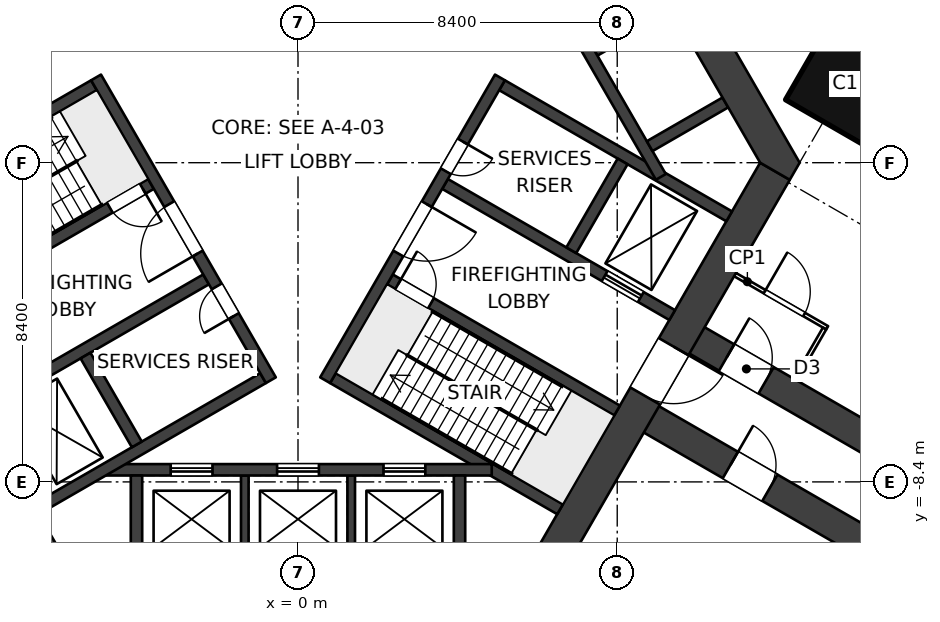
"""IFC4 building model, lengths in metres.
Left out: names, types, materials, properties, quantities, classifications, styles, units other than length and angle.
Written with IfcOpenShell. Run it as: python <this file> out.ifc"""

import sys

from ifc_helpers import new_model, si_unit, direction, frame, frame_2d, origin, origin_2d, place, context, subcontext, project, spatial, polyline, rectangle, outline, extrude, element, fill, save


model = new_model("IFC4")
c1 = context("Model", 3, precision=1e-05, world=origin(), true_north=direction((0.0, 1.0)))
c2 = subcontext(c1, "Body", "Model", "MODEL_VIEW")
j1 = project(units=[si_unit("LENGTHUNIT", "METRE"), si_unit("PLANEANGLEUNIT", "RADIAN")], contexts=[c1])
p1 = place(None, origin())
s1 = spatial("IfcSite", under=j1, at=p1, CompositionType="ELEMENT")
p2 = place(p1, origin())
s2 = spatial("IfcBuilding", under=s1, at=p2, CompositionType="ELEMENT")
p3 = place(p2, frame((0.0, 0.0, 16.0)))
s3 = spatial("IfcBuildingStorey", under=s2, at=p3, CompositionType="ELEMENT", Elevation=16.0)
p4 = place(p3, frame((14.4, 2.078, 0.0), z_axis=(0.0, 0.0, 1.0), x_axis=(-0.5, -0.866025403784, 0.0)))
e1 = element("IfcColumn", 1, at=p4, inside=s3, PredefinedType="COLUMN", context=c2, shape_type="SweptSolid", body=[
    extrude(rectangle(XDim=2.3, YDim=2.3, at=origin_2d()), origin(), (0.0, 0.0, 1.0), 5.0),
])
p5 = place(p3, frame((-6.47, -10.757, 0.0), z_axis=(0.0, 0.0, 1.0), x_axis=(-0.499997612506, 0.8660267822, 0.0)))
e2 = element("IfcWall", 2, at=p5, inside=s3, PredefinedType="SHEAR", context=c2, shape_type="SweptSolid", body=[
    extrude(rectangle(XDim=12.161, YDim=0.9, at=frame_2d((6.08, 0.0))), origin(), (0.0, 0.0, 1.0), 5.0),
])
p6 = place(p5, frame((5.33, 0.0, 0.0)))
e3 = element("IfcOpeningElement", 3, at=p6, cuts=e2, PredefinedType="OPENING", context=c2, shape_type="SweptSolid", body=[
    extrude(rectangle(XDim=1.5, YDim=2.1, at=frame_2d((0.75, 1.05))), frame((0.0, 0.46, 0.0), z_axis=(0.0, -1.0, 0.0), x_axis=(1.0, 0.0, 0.0)), (0.0, 0.0, 1.0), 0.92),
])
p7 = place(p3, frame((12.551, -0.225, 0.0), z_axis=(0.0, 0.0, 1.0), x_axis=(-0.499997612506, -0.8660267822, 0.0)))
e4 = element("IfcWall", 4, at=p7, inside=s3, PredefinedType="SHEAR", context=c2, shape_type="SweptSolid", body=[
    extrude(rectangle(XDim=12.161, YDim=0.9, at=frame_2d((6.08, 0.0))), origin(), (0.0, 0.0, 1.0), 5.0),
])
p8 = place(p7, frame((5.33, 0.0, 0.0)))
e5 = element("IfcOpeningElement", 5, at=p8, cuts=e4, PredefinedType="OPENING", context=c2, shape_type="SweptSolid", body=[
    extrude(rectangle(XDim=1.5, YDim=2.1, at=frame_2d((0.75, 1.05))), frame((0.0, 0.46, 0.0), z_axis=(0.0, -1.0, 0.0), x_axis=(1.0, 0.0, 0.0)), (0.0, 0.0, 1.0), 0.92),
])
p9 = place(p3, origin())
e6 = element("IfcWall", 6, at=p9, inside=s3, PredefinedType="SHEAR", context=c2, shape_type="SweptSolid", body=[
    extrude(outline(polyline([(13.2, 0.0), (6.6, 11.432), (6.08, 11.432), (6.08, 10.531), (12.161, 0.0), (12.94, -0.45), (13.2, 0.0)])), origin(), (0.0, 0.0, 1.0), 5.0),
])
p10 = place(p3, origin())
e7 = element("IfcWall", 7, at=p10, inside=s3, PredefinedType="SHEAR", context=c2, shape_type="SweptSolid", body=[
    extrude(outline(polyline([(-6.6, 11.432), (-13.2, 0.0), (-12.94, -0.45), (-12.161, 0.0), (-6.08, 10.531), (-6.08, 11.432), (-6.6, 11.432)])), origin(), (0.0, 0.0, 1.0), 5.0),
])
p11 = place(p3, frame((-0.714, -5.724, 0.0), z_axis=(0.0, 0.0, 1.0), x_axis=(-0.499995050369, 0.866028261437, 0.0)))
e8 = element("IfcWall", 8, at=p11, inside=s3, PredefinedType="SHEAR", context=c2, shape_type="SweptSolid", body=[
    extrude(rectangle(XDim=9.2, YDim=0.3, at=frame_2d((4.6, 0.0))), origin(), (0.0, 0.0, 1.0), 5.0),
])
p12 = place(p11, frame((3.85, 0.0, 0.0)))
e9 = element("IfcOpeningElement", 9, at=p12, cuts=e8, PredefinedType="OPENING", context=c2, shape_type="SweptSolid", body=[
    extrude(rectangle(XDim=1.5, YDim=2.1, at=frame_2d((0.75, 1.05))), frame((0.0, 0.16, 0.0), z_axis=(0.0, -1.0, 0.0), x_axis=(1.0, 0.0, 0.0)), (0.0, 0.0, 1.0), 0.32),
])
p13 = place(p11, frame((1.95, 0.0, 0.0)))
e10 = element("IfcOpeningElement", 10, at=p13, cuts=e8, PredefinedType="OPENING", context=c2, shape_type="SweptSolid", body=[
    extrude(rectangle(XDim=0.9, YDim=2.1, at=frame_2d((0.45, 1.05))), frame((0.0, 0.16, 0.0), z_axis=(0.0, -1.0, 0.0), x_axis=(1.0, 0.0, 0.0)), (0.0, 0.0, 1.0), 0.32),
])
p14 = place(p3, frame((-3.869, -0.559, 0.0), z_axis=(0.0, 0.0, 1.0), x_axis=(-0.86602711848, -0.499997030048, 0.0)))
e11 = element("IfcWall", 11, at=p14, inside=s3, PredefinedType="SHEAR", context=c2, shape_type="SweptSolid", body=[
    extrude(rectangle(XDim=6.901, YDim=0.3, at=frame_2d((3.451, 0.0))), origin(), (0.0, 0.0, 1.0), 5.0),
])
p15 = place(p14, frame((0.25, 0.0, 0.0)))
e12 = element("IfcOpeningElement", 12, at=p15, cuts=e11, PredefinedType="OPENING", context=c2, shape_type="SweptSolid", body=[
    extrude(rectangle(XDim=1.0, YDim=2.1, at=frame_2d((0.5, 1.05))), frame((0.0, 0.16, 0.0), z_axis=(0.0, -1.0, 0.0), x_axis=(1.0, 0.0, 0.0)), (0.0, 0.0, 1.0), 0.32),
])
p16 = place(p3, frame((-5.369, 2.039, 0.0), z_axis=(0.0, 0.0, 1.0), x_axis=(-0.86602711848, -0.499997030048, 0.0)))
e13 = element("IfcWall", 13, at=p16, inside=s3, PredefinedType="SHEAR", context=c2, shape_type="SweptSolid", body=[
    extrude(rectangle(XDim=6.901, YDim=0.3, at=frame_2d((3.451, 0.0))), origin(), (0.0, 0.0, 1.0), 5.0),
])
p17 = place(p3, frame((-2.419, -3.071, 0.0), z_axis=(0.0, 0.0, 1.0), x_axis=(-0.86602711848, -0.499997030048, 0.0)))
e14 = element("IfcWall", 14, at=p17, inside=s3, PredefinedType="SHEAR", context=c2, shape_type="SweptSolid", body=[
    extrude(rectangle(XDim=6.901, YDim=0.3, at=frame_2d((3.451, 0.0))), origin(), (0.0, 0.0, 1.0), 5.0),
])
p18 = place(p17, frame((4.85, 0.0, 0.0)))
e15 = element("IfcOpeningElement", 15, at=p18, cuts=e14, PredefinedType="OPENING", context=c2, shape_type="SweptSolid", body=[
    extrude(rectangle(XDim=1.1, YDim=2.1, at=frame_2d((0.55, 1.05))), frame((0.0, 0.16, 0.0), z_axis=(0.0, -1.0, 0.0), x_axis=(1.0, 0.0, 0.0)), (0.0, 0.0, 1.0), 0.32),
])
p19 = place(p3, frame((-0.919, -5.669, 0.0), z_axis=(0.0, 0.0, 1.0), x_axis=(-0.866011800373, -0.500023561059, 0.0)))
e16 = element("IfcWall", 16, at=p19, inside=s3, PredefinedType="SHEAR", context=c2, shape_type="SweptSolid", body=[
    extrude(rectangle(XDim=6.902, YDim=0.3, at=frame_2d((3.451, 0.0))), origin(), (0.0, 0.0, 1.0), 5.0),
])
p20 = place(p3, frame((-4.241, -7.414, 0.0), z_axis=(0.0, 0.0, 1.0), x_axis=(-0.500048589285, 0.86599734893, 0.0)))
e17 = element("IfcWall", 17, at=p20, inside=s3, PredefinedType="SHEAR", context=c2, shape_type="SweptSolid", body=[
    extrude(rectangle(XDim=2.7, YDim=0.3, at=frame_2d((1.35, 0.0))), origin(), (0.0, 0.0, 1.0), 5.0),
])
p21 = place(p3, frame((5.314, 2.244, 0.0), z_axis=(0.0, 0.0, 1.0), x_axis=(-0.499995050369, -0.866028261437, 0.0)))
e18 = element("IfcWall", 18, at=p21, inside=s3, PredefinedType="SHEAR", context=c2, shape_type="SweptSolid", body=[
    extrude(rectangle(XDim=9.2, YDim=0.3, at=frame_2d((4.6, 0.0))), origin(), (0.0, 0.0, 1.0), 5.0),
])
p22 = place(p21, frame((3.85, 0.0, 0.0)))
e19 = element("IfcOpeningElement", 19, at=p22, cuts=e18, PredefinedType="OPENING", context=c2, shape_type="SweptSolid", body=[
    extrude(rectangle(XDim=1.5, YDim=2.1, at=frame_2d((0.75, 1.05))), frame((0.0, 0.16, 0.0), z_axis=(0.0, -1.0, 0.0), x_axis=(1.0, 0.0, 0.0)), (0.0, 0.0, 1.0), 0.32),
])
p23 = place(p21, frame((1.95, 0.0, 0.0)))
e20 = element("IfcOpeningElement", 20, at=p23, cuts=e18, PredefinedType="OPENING", context=c2, shape_type="SweptSolid", body=[
    extrude(rectangle(XDim=0.9, YDim=2.1, at=frame_2d((0.45, 1.05))), frame((0.0, 0.16, 0.0), z_axis=(0.0, -1.0, 0.0), x_axis=(1.0, 0.0, 0.0)), (0.0, 0.0, 1.0), 0.32),
])
p24 = place(p3, frame((2.419, -3.071, 0.0), z_axis=(0.0, 0.0, 1.0), x_axis=(0.86602711848, -0.499997030048, 0.0)))
e21 = element("IfcWall", 21, at=p24, inside=s3, PredefinedType="SHEAR", context=c2, shape_type="SweptSolid", body=[
    extrude(rectangle(XDim=6.901, YDim=0.3, at=frame_2d((3.451, 0.0))), origin(), (0.0, 0.0, 1.0), 5.0),
])
p25 = place(p24, frame((0.25, 0.0, 0.0)))
e22 = element("IfcOpeningElement", 22, at=p25, cuts=e21, PredefinedType="OPENING", context=c2, shape_type="SweptSolid", body=[
    extrude(rectangle(XDim=1.0, YDim=2.1, at=frame_2d((0.5, 1.05))), frame((0.0, 0.16, 0.0), z_axis=(0.0, -1.0, 0.0), x_axis=(1.0, 0.0, 0.0)), (0.0, 0.0, 1.0), 0.32),
])
p26 = place(p3, frame((0.919, -5.669, 0.0), z_axis=(0.0, 0.0, 1.0), x_axis=(0.866011800373, -0.500023561059, 0.0)))
e23 = element("IfcWall", 23, at=p26, inside=s3, PredefinedType="SHEAR", context=c2, shape_type="SweptSolid", body=[
    extrude(rectangle(XDim=6.902, YDim=0.3, at=frame_2d((3.451, 0.0))), origin(), (0.0, 0.0, 1.0), 5.0),
])
p27 = place(p3, frame((3.869, -0.559, 0.0), z_axis=(0.0, 0.0, 1.0), x_axis=(0.86602711848, -0.499997030048, 0.0)))
e24 = element("IfcWall", 24, at=p27, inside=s3, PredefinedType="SHEAR", context=c2, shape_type="SweptSolid", body=[
    extrude(rectangle(XDim=6.901, YDim=0.3, at=frame_2d((3.451, 0.0))), origin(), (0.0, 0.0, 1.0), 5.0),
])
p28 = place(p27, frame((4.85, 0.0, 0.0)))
e25 = element("IfcOpeningElement", 25, at=p28, cuts=e24, PredefinedType="OPENING", context=c2, shape_type="SweptSolid", body=[
    extrude(rectangle(XDim=1.1, YDim=2.1, at=frame_2d((0.55, 1.05))), frame((0.0, 0.16, 0.0), z_axis=(0.0, -1.0, 0.0), x_axis=(1.0, 0.0, 0.0)), (0.0, 0.0, 1.0), 0.32),
])
p29 = place(p3, frame((5.369, 2.039, 0.0), z_axis=(0.0, 0.0, 1.0), x_axis=(0.86602711848, -0.499997030048, 0.0)))
e26 = element("IfcWall", 26, at=p29, inside=s3, PredefinedType="SHEAR", context=c2, shape_type="SweptSolid", body=[
    extrude(rectangle(XDim=6.901, YDim=0.3, at=frame_2d((3.451, 0.0))), origin(), (0.0, 0.0, 1.0), 5.0),
])
p30 = place(p3, frame((8.541, 0.034, 0.0), z_axis=(0.0, 0.0, 1.0), x_axis=(-0.50000943426, -0.866019956843, 0.0)))
e27 = element("IfcWall", 27, at=p30, inside=s3, PredefinedType="SHEAR", context=c2, shape_type="SweptSolid", body=[
    extrude(rectangle(XDim=2.7, YDim=0.3, at=frame_2d((1.35, 0.0))), origin(), (0.0, 0.0, 1.0), 5.0),
])
p31 = place(p3, frame((5.098, -8.082, 0.0), z_axis=(0.0, 0.0, 1.0), x_axis=(-1.0, 0.0, 0.0)))
e28 = element("IfcWall", 28, at=p31, inside=s3, PredefinedType="SHEAR", context=c2, shape_type="SweptSolid", body=[
    extrude(rectangle(XDim=10.195, YDim=0.3, at=frame_2d((5.098, 0.0))), origin(), (0.0, 0.0, 1.0), 5.0),
])
p32 = place(p31, frame((1.748, 0.0, 0.0)))
e29 = element("IfcOpeningElement", 29, at=p32, cuts=e28, PredefinedType="OPENING", context=c2, shape_type="SweptSolid", body=[
    extrude(rectangle(XDim=1.1, YDim=2.1, at=frame_2d((0.55, 1.05))), frame((0.0, 0.16, 0.0), z_axis=(0.0, -1.0, 0.0), x_axis=(1.0, 0.0, 0.0)), (0.0, 0.0, 1.0), 0.32),
])
p33 = place(p31, frame((4.548, 0.0, 0.0)))
e30 = element("IfcOpeningElement", 30, at=p33, cuts=e28, PredefinedType="OPENING", context=c2, shape_type="SweptSolid", body=[
    extrude(rectangle(XDim=1.1, YDim=2.1, at=frame_2d((0.55, 1.05))), frame((0.0, 0.16, 0.0), z_axis=(0.0, -1.0, 0.0), x_axis=(1.0, 0.0, 0.0)), (0.0, 0.0, 1.0), 0.32),
])
p34 = place(p31, frame((7.348, 0.0, 0.0)))
e31 = element("IfcOpeningElement", 31, at=p34, cuts=e28, PredefinedType="OPENING", context=c2, shape_type="SweptSolid", body=[
    extrude(rectangle(XDim=1.1, YDim=2.1, at=frame_2d((0.55, 1.05))), frame((0.0, 0.16, 0.0), z_axis=(0.0, -1.0, 0.0), x_axis=(1.0, 0.0, 0.0)), (0.0, 0.0, 1.0), 0.32),
])
for number, where, z_axis, x_axis in (
    (32, (4.25, -8.231, 0.0), (0.0, 0.0, 1.0), (0.0, -1.0, 0.0)),
    (33, (-4.25, -8.231, 0.0), (0.0, 0.0, 1.0), (0.0, -1.0, 0.0)),
):
    element("IfcWall", number, at=place(p3, frame(where, z_axis=z_axis, x_axis=x_axis)), inside=s3, PredefinedType="SHEAR", context=c2, shape_type="SweptSolid", body=[
        extrude(rectangle(XDim=2.3, YDim=0.3, at=frame_2d((1.15, 0.0))), origin(), (0.0, 0.0, 1.0), 5.0),
    ])
for number, where, z_axis, x_axis in (
    (34, (1.4, -8.231, 0.0), (0.0, 0.0, 1.0), (0.0, -1.0, 0.0)),
    (35, (-1.4, -8.231, 0.0), (0.0, 0.0, 1.0), (0.0, -1.0, 0.0)),
):
    element("IfcWall", number, at=place(p3, frame(where, z_axis=z_axis, x_axis=x_axis)), inside=s3, PredefinedType="SHEAR", context=c2, shape_type="SweptSolid", body=[
        extrude(rectangle(XDim=2.3, YDim=0.2, at=frame_2d((1.15, 0.0))), origin(), (0.0, 0.0, 1.0), 5.0),
    ])
p35 = place(p3, frame((4.45, 8.455, 0.0), z_axis=(0.0, 0.0, 1.0), x_axis=(0.500002290144, -0.866024081565, 0.0)))
e36 = element("IfcWall", 36, at=p35, inside=s3, PredefinedType="SHEAR", context=c2, shape_type="SweptSolid", body=[
    extrude(rectangle(XDim=10.195, YDim=0.3, at=frame_2d((5.098, 0.0))), origin(), (0.0, 0.0, 1.0), 5.0),
])
p36 = place(p3, frame((9.254, 0.435, 0.0), z_axis=(0.0, 0.0, 1.0), x_axis=(0.866007057882, 0.500031774688, 0.0)))
e37 = element("IfcWall", 37, at=p36, inside=s3, PredefinedType="SHEAR", context=c2, shape_type="SweptSolid", body=[
    extrude(rectangle(XDim=2.3, YDim=0.3, at=frame_2d((1.15, 0.0))), origin(), (0.0, 0.0, 1.0), 5.0),
])
p37 = place(p3, frame((7.829, 2.903, 0.0), z_axis=(0.0, 0.0, 1.0), x_axis=(0.866053019151, 0.499952165731, 0.0)))
e38 = element("IfcWall", 38, at=p37, inside=s3, PredefinedType="SHEAR", context=c2, shape_type="SweptSolid", body=[
    extrude(rectangle(XDim=2.3, YDim=0.2, at=frame_2d((1.15, 0.0))), origin(), (0.0, 0.0, 1.0), 5.0),
])
p38 = place(p3, frame((-9.548, -0.374, 0.0), z_axis=(0.0, 0.0, 1.0), x_axis=(0.500002290144, 0.866024081565, 0.0)))
e39 = element("IfcWall", 39, at=p38, inside=s3, PredefinedType="SHEAR", context=c2, shape_type="SweptSolid", body=[
    extrude(rectangle(XDim=10.195, YDim=0.3, at=frame_2d((5.098, 0.0))), origin(), (0.0, 0.0, 1.0), 5.0),
])
p39 = place(p3, frame((10.11, -4.451, 0.0), z_axis=(0.0, 0.0, 1.0), x_axis=(0.866025284237, -0.500000207062, 0.0)))
e40 = element("IfcWall", 40, at=p39, inside=s3, PredefinedType="SHEAR", context=c2, shape_type="SweptSolid", body=[
    extrude(rectangle(XDim=36.75, YDim=0.8, at=frame_2d((18.375, 0.0))), origin(), (0.0, 0.0, 1.0), 5.0),
])
p40 = place(p39, frame((1.35, 0.0, 0.0)))
e41 = element("IfcOpeningElement", 41, at=p40, cuts=e40, PredefinedType="OPENING", context=c2, shape_type="SweptSolid", body=[
    extrude(rectangle(XDim=1.2, YDim=2.1, at=frame_2d((0.6, 1.05))), frame((0.0, 0.41, 0.0), z_axis=(0.0, -1.0, 0.0), x_axis=(1.0, 0.0, 0.0)), (0.0, 0.0, 1.0), 0.82),
])
p41 = place(p3, frame((8.91, -6.53, 0.0), z_axis=(0.0, 0.0, 1.0), x_axis=(0.866025284237, -0.500000207062, 0.0)))
e42 = element("IfcWall", 42, at=p41, inside=s3, PredefinedType="SHEAR", context=c2, shape_type="SweptSolid", body=[
    extrude(rectangle(XDim=36.75, YDim=0.8, at=frame_2d((18.375, 0.0))), origin(), (0.0, 0.0, 1.0), 5.0),
])
p42 = place(p41, frame((10.0, 0.0, 0.0)))
e43 = element("IfcOpeningElement", 43, at=p42, cuts=e42, PredefinedType="OPENING", context=c2, shape_type="SweptSolid", body=[
    extrude(rectangle(XDim=1.0, YDim=2.1, at=frame_2d((0.5, 1.05))), frame((0.0, 0.41, 0.0), z_axis=(0.0, -1.0, 0.0), x_axis=(1.0, 0.0, 0.0)), (0.0, 0.0, 1.0), 0.82),
])
p43 = place(p41, frame((2.85, 0.0, 0.0)))
e44 = element("IfcOpeningElement", 44, at=p43, cuts=e42, PredefinedType="OPENING", context=c2, shape_type="SweptSolid", body=[
    extrude(rectangle(XDim=1.2, YDim=2.1, at=frame_2d((0.6, 1.05))), frame((0.0, 0.41, 0.0), z_axis=(0.0, -1.0, 0.0), x_axis=(1.0, 0.0, 0.0)), (0.0, 0.0, 1.0), 0.82),
])
p44 = place(p3, frame((11.5, -2.945, 0.0), z_axis=(0.0, 0.0, 1.0), x_axis=(0.866034573852, -0.49998411664, 0.0)))
e45 = element("IfcWall", 45, at=p44, inside=s3, PredefinedType="PARTITIONING", context=c2, shape_type="SweptSolid", body=[
    extrude(rectangle(XDim=2.8, YDim=0.1, at=frame_2d((1.4, 0.0))), origin(), (0.0, 0.0, 1.0), 4.7),
])
p45 = place(p44, frame((0.9, 0.0, 0.0)))
e46 = element("IfcOpeningElement", 46, at=p45, cuts=e45, PredefinedType="OPENING", context=c2, shape_type="SweptSolid", body=[
    extrude(rectangle(XDim=1.2, YDim=2.1, at=frame_2d((0.6, 1.05))), frame((0.0, 0.06, 0.0), z_axis=(0.0, -1.0, 0.0), x_axis=(1.0, 0.0, 0.0)), (0.0, 0.0, 1.0), 0.12),
])
p46 = place(p3, frame((13.082, -5.705, 0.0), z_axis=(0.0, 0.0, 1.0), x_axis=(0.500086022567, 0.865975732936, 0.0)))
e47 = element("IfcWall", 47, at=p46, inside=s3, PredefinedType="PARTITIONING", context=c2, shape_type="SweptSolid", body=[
    extrude(rectangle(XDim=1.55, YDim=0.1, at=frame_2d((0.775, 0.0))), origin(), (0.0, 0.0, 1.0), 4.7),
])
p47 = place(p3, frame((9.45, 6.495, 0.0), z_axis=(0.0, 0.0, 1.0), x_axis=(0.866025301493, -0.500000177174, 0.0)))
e48 = element("IfcWall", 48, at=p47, inside=s3, PredefinedType="SOLIDWALL", context=c2, shape_type="SweptSolid", body=[
    extrude(rectangle(XDim=43.095, YDim=0.3, at=frame_2d((21.548, 0.0))), origin(), (0.0, 0.0, 1.0), 4.7),
])
p48 = place(p47, frame((26.595, 0.0, 0.0)))
e49 = element("IfcOpeningElement", 49, at=p48, cuts=e48, PredefinedType="OPENING", context=c2, shape_type="SweptSolid", body=[
    extrude(rectangle(XDim=1.8, YDim=2.4, at=frame_2d((0.9, 1.2))), frame((0.0, 0.16, 0.0), z_axis=(0.0, -1.0, 0.0), x_axis=(1.0, 0.0, 0.0)), (0.0, 0.0, 1.0), 0.32),
])
p49 = place(p32, origin())
e50 = element("IfcDoor", 50, at=p49, inside=s3, OperationType="DOUBLE_DOOR_SLIDING", PredefinedType="DOOR", context=c2, shape_type="SweptSolid", body=[
    extrude(rectangle(XDim=1.1, YDim=2.1, at=frame_2d((0.55, 1.05))), frame((0.0, 0.025, 0.0), z_axis=(0.0, -1.0, 0.0), x_axis=(1.0, 0.0, 0.0)), (0.0, 0.0, 1.0), 0.05),
])
fill(e29, e50)
p50 = place(p33, origin())
e51 = element("IfcDoor", 51, at=p50, inside=s3, OperationType="DOUBLE_DOOR_SLIDING", PredefinedType="DOOR", context=c2, shape_type="SweptSolid", body=[
    extrude(rectangle(XDim=1.1, YDim=2.1, at=frame_2d((0.55, 1.05))), frame((0.0, 0.025, 0.0), z_axis=(0.0, -1.0, 0.0), x_axis=(1.0, 0.0, 0.0)), (0.0, 0.0, 1.0), 0.05),
])
fill(e30, e51)
p51 = place(p34, origin())
e52 = element("IfcDoor", 52, at=p51, inside=s3, OperationType="DOUBLE_DOOR_SLIDING", PredefinedType="DOOR", context=c2, shape_type="SweptSolid", body=[
    extrude(rectangle(XDim=1.1, YDim=2.1, at=frame_2d((0.55, 1.05))), frame((0.0, 0.025, 0.0), z_axis=(0.0, -1.0, 0.0), x_axis=(1.0, 0.0, 0.0)), (0.0, 0.0, 1.0), 0.05),
])
fill(e31, e52)
p52 = place(p28, origin())
e53 = element("IfcDoor", 53, at=p52, inside=s3, OperationType="DOUBLE_DOOR_SLIDING", PredefinedType="DOOR", context=c2, shape_type="SweptSolid", body=[
    extrude(rectangle(XDim=1.1, YDim=2.1, at=frame_2d((0.55, 1.05))), frame((0.0, 0.025, 0.0), z_axis=(0.0, -1.0, 0.0), x_axis=(1.0, 0.0, 0.0)), (0.0, 0.0, 1.0), 0.05),
])
fill(e25, e53)
p53 = place(p12, origin())
e54 = element("IfcDoor", 54, at=p53, inside=s3, OperationType="DOUBLE_DOOR_DOUBLE_SWING", PredefinedType="DOOR", context=c2, shape_type="SweptSolid", body=[
    extrude(rectangle(XDim=1.5, YDim=2.1, at=frame_2d((0.75, 1.05))), frame((0.0, 0.025, 0.0), z_axis=(0.0, -1.0, 0.0), x_axis=(1.0, 0.0, 0.0)), (0.0, 0.0, 1.0), 0.05),
])
fill(e9, e54)
p54 = place(p13, origin())
e55 = element("IfcDoor", 55, at=p54, inside=s3, OperationType="SINGLE_SWING_LEFT", PredefinedType="DOOR", context=c2, shape_type="SweptSolid", body=[
    extrude(rectangle(XDim=0.9, YDim=2.1, at=frame_2d((0.45, 1.05))), frame((0.0, 0.025, 0.0), z_axis=(0.0, -1.0, 0.0), x_axis=(1.0, 0.0, 0.0)), (0.0, 0.0, 1.0), 0.05),
])
fill(e10, e55)
p55 = place(p15, origin())
e56 = element("IfcDoor", 56, at=p55, inside=s3, OperationType="SINGLE_SWING_LEFT", PredefinedType="DOOR", context=c2, shape_type="SweptSolid", body=[
    extrude(rectangle(XDim=1.0, YDim=2.1, at=frame_2d((0.5, 1.05))), frame((0.0, 0.025, 0.0), z_axis=(0.0, -1.0, 0.0), x_axis=(1.0, 0.0, 0.0)), (0.0, 0.0, 1.0), 0.05),
])
fill(e12, e56)
p56 = place(p22, origin())
e57 = element("IfcDoor", 57, at=p56, inside=s3, OperationType="DOUBLE_DOOR_DOUBLE_SWING", PredefinedType="DOOR", context=c2, shape_type="SweptSolid", body=[
    extrude(rectangle(XDim=1.5, YDim=2.1, at=frame_2d((0.75, 1.05))), frame((0.0, 0.025, 0.0), z_axis=(0.0, -1.0, 0.0), x_axis=(1.0, 0.0, 0.0)), (0.0, 0.0, 1.0), 0.05),
])
fill(e19, e57)
p57 = place(p23, origin())
e58 = element("IfcDoor", 58, at=p57, inside=s3, OperationType="SINGLE_SWING_LEFT", PredefinedType="DOOR", context=c2, shape_type="SweptSolid", body=[
    extrude(rectangle(XDim=0.9, YDim=2.1, at=frame_2d((0.45, 1.05))), frame((0.0, 0.025, 0.0), z_axis=(0.0, -1.0, 0.0), x_axis=(1.0, 0.0, 0.0)), (0.0, 0.0, 1.0), 0.05),
])
fill(e20, e58)
p58 = place(p25, origin())
e59 = element("IfcDoor", 59, at=p58, inside=s3, OperationType="SINGLE_SWING_LEFT", PredefinedType="DOOR", context=c2, shape_type="SweptSolid", body=[
    extrude(rectangle(XDim=1.0, YDim=2.1, at=frame_2d((0.5, 1.05))), frame((0.0, 0.025, 0.0), z_axis=(0.0, -1.0, 0.0), x_axis=(1.0, 0.0, 0.0)), (0.0, 0.0, 1.0), 0.05),
])
fill(e22, e59)
p59 = place(p8, origin())
e60 = element("IfcDoor", 60, at=p59, inside=s3, OperationType="DOUBLE_DOOR_DOUBLE_SWING", PredefinedType="DOOR", context=c2, shape_type="SweptSolid", body=[
    extrude(rectangle(XDim=1.5, YDim=2.1, at=frame_2d((0.75, 1.05))), frame((0.0, 0.025, 0.0), z_axis=(0.0, -1.0, 0.0), x_axis=(1.0, 0.0, 0.0)), (0.0, 0.0, 1.0), 0.05),
])
fill(e5, e60)
p60 = place(p40, origin())
e61 = element("IfcDoor", 61, at=p60, inside=s3, OperationType="DOUBLE_SWING_LEFT", PredefinedType="DOOR", context=c2, shape_type="SweptSolid", body=[
    extrude(rectangle(XDim=1.2, YDim=2.1, at=frame_2d((0.6, 1.05))), frame((0.0, 0.025, 0.0), z_axis=(0.0, -1.0, 0.0), x_axis=(1.0, 0.0, 0.0)), (0.0, 0.0, 1.0), 0.05),
])
fill(e41, e61)
p61 = place(p45, origin())
e62 = element("IfcDoor", 62, at=p61, inside=s3, OperationType="DOUBLE_SWING_LEFT", PredefinedType="DOOR", context=c2, shape_type="SweptSolid", body=[
    extrude(rectangle(XDim=1.2, YDim=2.1, at=frame_2d((0.6, 1.05))), frame((0.0, 0.025, 0.0), z_axis=(0.0, -1.0, 0.0), x_axis=(1.0, 0.0, 0.0)), (0.0, 0.0, 1.0), 0.05),
])
fill(e46, e62)
p62 = place(p43, origin())
e63 = element("IfcDoor", 63, at=p62, inside=s3, OperationType="DOUBLE_SWING_LEFT", PredefinedType="DOOR", context=c2, shape_type="SweptSolid", body=[
    extrude(rectangle(XDim=1.2, YDim=2.1, at=frame_2d((0.6, 1.05))), frame((0.0, 0.025, 0.0), z_axis=(0.0, -1.0, 0.0), x_axis=(1.0, 0.0, 0.0)), (0.0, 0.0, 1.0), 0.05),
])
fill(e44, e63)
save(model, sys.argv[1])
